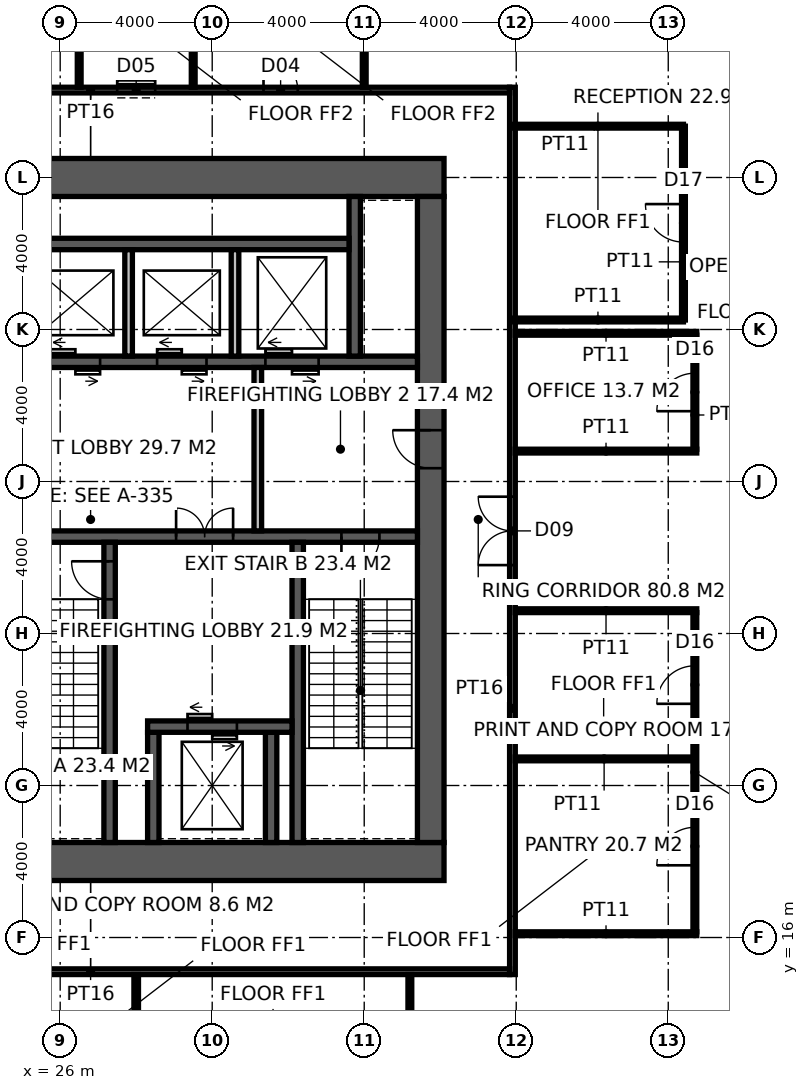
"""IFC4 building model, lengths in metres.
Left out: names, types, materials, properties, quantities, classifications, styles, units other than length and angle.
Written with IfcOpenShell. Run it as: python <this file> out.ifc"""

import sys

from ifc_helpers import new_model, si_unit, direction, frame, frame_2d, origin, place, context, subcontext, project, spatial, rectangle, extrude, element, fill, save


model = new_model("IFC4")
c1 = context("Model", 3, precision=1e-05, world=origin(), true_north=direction((0.0, 1.0)))
c2 = subcontext(c1, "Body", "Model", "MODEL_VIEW")
j1 = project(units=[si_unit("LENGTHUNIT", "METRE"), si_unit("PLANEANGLEUNIT", "RADIAN")], contexts=[c1])
p1 = place(None, origin())
s1 = spatial("IfcSite", under=j1, at=p1, CompositionType="ELEMENT")
p2 = place(p1, origin())
s2 = spatial("IfcBuilding", under=s1, at=p2, CompositionType="ELEMENT")
p3 = place(p2, frame((0.0, 0.0, 209.2)))
s3 = spatial("IfcBuildingStorey", under=s2, at=p3, CompositionType="ELEMENT", Elevation=209.2)
p4 = place(p3, frame((18.5, 18.0, -0.15), z_axis=(0.0, 0.0, 1.0), x_axis=(1.0, 0.0, 0.0)))
e1 = element("IfcWall", 1, at=p4, inside=s3, PredefinedType="SHEAR", context=c2, shape_type="SweptSolid", body=[
    extrude(rectangle(XDim=17.6, YDim=1.0, at=frame_2d((8.8, 0.0))), origin(), (0.0, 0.0, 1.0), 5.0),
])
p5 = place(p4, frame((3.45, 0.0, 0.15)))
e2 = element("IfcOpeningElement", 2, at=p5, cuts=e1, PredefinedType="OPENING", context=c2, shape_type="SweptSolid", body=[
    extrude(rectangle(XDim=1.5, YDim=2.4, at=frame_2d((0.75, 1.2))), frame((0.0, 0.51, 0.0), z_axis=(0.0, -1.0, 0.0), x_axis=(1.0, 0.0, 0.0)), (0.0, 0.0, 1.0), 1.02),
])
p6 = place(p3, frame((18.5, 36.0, -0.15), z_axis=(0.0, 0.0, 1.0), x_axis=(1.0, 0.0, 0.0)))
e3 = element("IfcWall", 3, at=p6, inside=s3, PredefinedType="SHEAR", context=c2, shape_type="SweptSolid", body=[
    extrude(rectangle(XDim=17.6, YDim=1.0, at=frame_2d((8.8, 0.0))), origin(), (0.0, 0.0, 1.0), 5.0),
])
p7 = place(p3, frame((35.75, 18.5, -0.15), z_axis=(0.0, 0.0, 1.0), x_axis=(0.0, 1.0, 0.0)))
e4 = element("IfcWall", 4, at=p7, inside=s3, PredefinedType="SHEAR", context=c2, shape_type="SweptSolid", body=[
    extrude(rectangle(XDim=17.0, YDim=0.7, at=frame_2d((8.5, 0.0))), origin(), (0.0, 0.0, 1.0), 5.0),
])
p8 = place(p7, frame((9.85, 0.0, 0.15)))
e5 = element("IfcOpeningElement", 5, at=p8, cuts=e4, PredefinedType="OPENING", context=c2, shape_type="SweptSolid", body=[
    extrude(rectangle(XDim=1.0, YDim=2.2, at=frame_2d((0.5, 1.1))), frame((0.0, 0.36, 0.0), z_axis=(0.0, -1.0, 0.0), x_axis=(1.0, 0.0, 0.0)), (0.0, 0.0, 1.0), 0.72),
])
p9 = place(p3, frame((24.15, 26.55, -0.15), z_axis=(0.0, 0.0, 1.0), x_axis=(1.0, 0.0, 0.0)))
e6 = element("IfcWall", 6, at=p9, inside=s3, PredefinedType="SHEAR", context=c2, shape_type="SweptSolid", body=[
    extrude(rectangle(XDim=11.25, YDim=0.3, at=frame_2d((5.625, 0.0))), origin(), (0.0, 0.0, 1.0), 5.0),
])
p10 = place(p9, frame((9.25, 0.0, 0.15)))
e7 = element("IfcOpeningElement", 7, at=p10, cuts=e6, PredefinedType="OPENING", context=c2, shape_type="SweptSolid", body=[
    extrude(rectangle(XDim=1.0, YDim=2.2, at=frame_2d((0.5, 1.1))), frame((0.0, 0.16, 0.0), z_axis=(0.0, -1.0, 0.0), x_axis=(1.0, 0.0, 0.0)), (0.0, 0.0, 1.0), 0.32),
])
p11 = place(p9, frame((4.9, 0.0, 0.15)))
e8 = element("IfcOpeningElement", 8, at=p11, cuts=e6, PredefinedType="OPENING", context=c2, shape_type="SweptSolid", body=[
    extrude(rectangle(XDim=1.5, YDim=2.4, at=frame_2d((0.75, 1.2))), frame((0.0, 0.16, 0.0), z_axis=(0.0, -1.0, 0.0), x_axis=(1.0, 0.0, 0.0)), (0.0, 0.0, 1.0), 0.32),
])
p12 = place(p3, frame((27.3, 18.5, -0.15), z_axis=(0.0, 0.0, 1.0), x_axis=(0.0, 1.0, 0.0)))
e9 = element("IfcWall", 9, at=p12, inside=s3, PredefinedType="SHEAR", context=c2, shape_type="SweptSolid", body=[
    extrude(rectangle(XDim=7.9, YDim=0.3, at=frame_2d((3.95, 0.0))), origin(), (0.0, 0.0, 1.0), 5.0),
])
p13 = place(p12, frame((6.4, 0.0, 0.15)))
e10 = element("IfcOpeningElement", 10, at=p13, cuts=e9, PredefinedType="OPENING", context=c2, shape_type="SweptSolid", body=[
    extrude(rectangle(XDim=1.0, YDim=2.2, at=frame_2d((0.5, 1.1))), frame((0.0, 0.16, 0.0), z_axis=(0.0, -1.0, 0.0), x_axis=(1.0, 0.0, 0.0)), (0.0, 0.0, 1.0), 0.32),
])
p14 = place(p3, frame((32.25, 18.5, -0.15), z_axis=(0.0, 0.0, 1.0), x_axis=(0.0, 1.0, 0.0)))
e11 = element("IfcWall", 11, at=p14, inside=s3, PredefinedType="SHEAR", context=c2, shape_type="SweptSolid", body=[
    extrude(rectangle(XDim=7.9, YDim=0.3, at=frame_2d((3.95, 0.0))), origin(), (0.0, 0.0, 1.0), 5.0),
])
for number, where, z_axis, x_axis in (
    (12, (28.45, 18.5, -0.15), (0.0, 0.0, 1.0), (0.0, 1.0, 0.0)),
    (13, (31.55, 18.5, -0.15), (0.0, 0.0, 1.0), (0.0, 1.0, 0.0)),
):
    element("IfcWall", number, at=place(p3, frame(where, z_axis=z_axis, x_axis=x_axis)), inside=s3, PredefinedType="SHEAR", context=c2, shape_type="SweptSolid", body=[
        extrude(rectangle(XDim=2.9, YDim=0.3, at=frame_2d((1.45, 0.0))), origin(), (0.0, 0.0, 1.0), 5.0),
    ])
p15 = place(p3, frame((28.3, 21.55, -0.15), z_axis=(0.0, 0.0, 1.0), x_axis=(1.0, 0.0, 0.0)))
e14 = element("IfcWall", 14, at=p15, inside=s3, PredefinedType="SHEAR", context=c2, shape_type="SweptSolid", body=[
    extrude(rectangle(XDim=3.8, YDim=0.3, at=frame_2d((1.9, 0.0))), origin(), (0.0, 0.0, 1.0), 5.0),
])
p16 = place(p15, frame((1.05, 0.0, 0.15)))
e15 = element("IfcOpeningElement", 15, at=p16, cuts=e14, PredefinedType="OPENING", context=c2, shape_type="SweptSolid", body=[
    extrude(rectangle(XDim=1.3, YDim=2.4, at=frame_2d((0.65, 1.2))), frame((0.0, 0.16, 0.0), z_axis=(0.0, -1.0, 0.0), x_axis=(1.0, 0.0, 0.0)), (0.0, 0.0, 1.0), 0.32),
])
p17 = place(p3, frame((24.15, 31.15, -0.15), z_axis=(0.0, 0.0, 1.0), x_axis=(1.0, 0.0, 0.0)))
e16 = element("IfcWall", 16, at=p17, inside=s3, PredefinedType="SHEAR", context=c2, shape_type="SweptSolid", body=[
    extrude(rectangle(XDim=11.25, YDim=0.3, at=frame_2d((5.625, 0.0))), origin(), (0.0, 0.0, 1.0), 5.0),
])
p18 = place(p17, frame((1.6, 0.0, 0.15)))
e17 = element("IfcOpeningElement", 17, at=p18, cuts=e16, PredefinedType="OPENING", context=c2, shape_type="SweptSolid", body=[
    extrude(rectangle(XDim=1.3, YDim=2.4, at=frame_2d((0.65, 1.2))), frame((0.0, 0.16, 0.0), z_axis=(0.0, -1.0, 0.0), x_axis=(1.0, 0.0, 0.0)), (0.0, 0.0, 1.0), 0.32),
])
p19 = place(p17, frame((4.4, 0.0, 0.15)))
e18 = element("IfcOpeningElement", 18, at=p19, cuts=e16, PredefinedType="OPENING", context=c2, shape_type="SweptSolid", body=[
    extrude(rectangle(XDim=1.3, YDim=2.4, at=frame_2d((0.65, 1.2))), frame((0.0, 0.16, 0.0), z_axis=(0.0, -1.0, 0.0), x_axis=(1.0, 0.0, 0.0)), (0.0, 0.0, 1.0), 0.32),
])
p20 = place(p17, frame((7.25, 0.0, 0.15)))
e19 = element("IfcOpeningElement", 19, at=p20, cuts=e16, PredefinedType="OPENING", context=c2, shape_type="SweptSolid", body=[
    extrude(rectangle(XDim=1.4, YDim=2.4, at=frame_2d((0.7, 1.2))), frame((0.0, 0.16, 0.0), z_axis=(0.0, -1.0, 0.0), x_axis=(1.0, 0.0, 0.0)), (0.0, 0.0, 1.0), 0.32),
])
p21 = place(p3, frame((33.75, 31.3, -0.15), z_axis=(0.0, 0.0, 1.0), x_axis=(0.0, 1.0, 0.0)))
e20 = element("IfcWall", 20, at=p21, inside=s3, PredefinedType="SHEAR", context=c2, shape_type="SweptSolid", body=[
    extrude(rectangle(XDim=4.2, YDim=0.3, at=frame_2d((2.1, 0.0))), origin(), (0.0, 0.0, 1.0), 5.0),
])
p22 = place(p3, frame((25.0, 34.25, -0.15), z_axis=(0.0, 0.0, 1.0), x_axis=(1.0, 0.0, 0.0)))
e21 = element("IfcWall", 21, at=p22, inside=s3, PredefinedType="SHEAR", context=c2, shape_type="SweptSolid", body=[
    extrude(rectangle(XDim=8.6, YDim=0.3, at=frame_2d((4.3, 0.0))), origin(), (0.0, 0.0, 1.0), 5.0),
])
for number, where, z_axis, x_axis in (
    (22, (27.8, 31.3, -0.15), (0.0, 0.0, 1.0), (0.0, 1.0, 0.0)),
    (23, (30.6, 31.3, -0.15), (0.0, 0.0, 1.0), (0.0, 1.0, 0.0)),
):
    element("IfcWall", number, at=place(p3, frame(where, z_axis=z_axis, x_axis=x_axis)), inside=s3, PredefinedType="SOLIDWALL", context=c2, shape_type="SweptSolid", body=[
        extrude(rectangle(XDim=2.8, YDim=0.2, at=frame_2d((1.4, 0.0))), origin(), (0.0, 0.0, 1.0), 5.0),
    ])
p23 = place(p3, frame((31.2, 26.7, 0.0), z_axis=(0.0, 0.0, 1.0), x_axis=(0.0, 1.0, 0.0)))
e24 = element("IfcWall", 24, at=p23, inside=s3, PredefinedType="SOLIDWALL", context=c2, shape_type="SweptSolid", body=[
    extrude(rectangle(XDim=4.3, YDim=0.2, at=frame_2d((2.15, 0.0))), origin(), (0.0, 0.0, 1.0), 4.85),
])
p24 = place(p3, frame((37.9, 15.025, 0.0), z_axis=(0.0, 0.0, 1.0), x_axis=(0.0, 1.0, 0.0)))
e25 = element("IfcWall", 25, at=p24, inside=s3, PredefinedType="PARTITIONING", context=c2, shape_type="SweptSolid", body=[
    extrude(rectangle(XDim=23.35, YDim=0.15, at=frame_2d((11.675, 0.0))), origin(), (0.0, 0.0, 1.0), 3.95),
])
p25 = place(p24, frame((10.775, 0.0, 0.0)))
e26 = element("IfcOpeningElement", 26, at=p25, cuts=e25, PredefinedType="OPENING", context=c2, shape_type="SweptSolid", body=[
    extrude(rectangle(XDim=1.8, YDim=2.4, at=frame_2d((0.9, 1.2))), frame((0.0, 0.085, 0.0), z_axis=(0.0, -1.0, 0.0), x_axis=(1.0, 0.0, 0.0)), (0.0, 0.0, 1.0), 0.17),
])
p26 = place(p3, frame((15.775, 15.1, 0.0), z_axis=(0.0, 0.0, 1.0), x_axis=(1.0, 0.0, 0.0)))
e27 = element("IfcWall", 27, at=p26, inside=s3, PredefinedType="PARTITIONING", context=c2, shape_type="SweptSolid", body=[
    extrude(rectangle(XDim=22.05, YDim=0.15, at=frame_2d((11.025, 0.0))), origin(), (0.0, 0.0, 1.0), 4.85),
])
p27 = place(p3, frame((15.775, 38.3, 0.0), z_axis=(0.0, 0.0, 1.0), x_axis=(1.0, 0.0, 0.0)))
e28 = element("IfcWall", 28, at=p27, inside=s3, PredefinedType="PARTITIONING", context=c2, shape_type="SweptSolid", body=[
    extrude(rectangle(XDim=22.05, YDim=0.15, at=frame_2d((11.025, 0.0))), origin(), (0.0, 0.0, 1.0), 4.85),
])
p28 = place(p27, frame((7.975, 0.0, 0.0)))
e29 = element("IfcOpeningElement", 29, at=p28, cuts=e28, PredefinedType="OPENING", context=c2, shape_type="SweptSolid", body=[
    extrude(rectangle(XDim=0.9, YDim=2.1, at=frame_2d((0.45, 1.05))), frame((0.0, 0.085, 0.0), z_axis=(0.0, -1.0, 0.0), x_axis=(1.0, 0.0, 0.0)), (0.0, 0.0, 1.0), 0.17),
])
p29 = place(p27, frame((11.725, 0.0, 0.0)))
e30 = element("IfcOpeningElement", 30, at=p29, cuts=e28, PredefinedType="OPENING", context=c2, shape_type="SweptSolid", body=[
    extrude(rectangle(XDim=1.0, YDim=2.1, at=frame_2d((0.5, 1.05))), frame((0.0, 0.085, 0.0), z_axis=(0.0, -1.0, 0.0), x_axis=(1.0, 0.0, 0.0)), (0.0, 0.0, 1.0), 0.17),
])
p30 = place(p27, frame((15.575, 0.0, 0.0)))
e31 = element("IfcOpeningElement", 31, at=p30, cuts=e28, PredefinedType="OPENING", context=c2, shape_type="SweptSolid", body=[
    extrude(rectangle(XDim=0.9, YDim=2.1, at=frame_2d((0.45, 1.05))), frame((0.0, 0.085, 0.0), z_axis=(0.0, -1.0, 0.0), x_axis=(1.0, 0.0, 0.0)), (0.0, 0.0, 1.0), 0.17),
])
p31 = place(p3, frame((34.0, 38.375, 0.0), z_axis=(0.0, 0.0, 1.0), x_axis=(0.0, 1.0, 0.0)))
e32 = element("IfcWall", 32, at=p31, inside=s3, PredefinedType="PARTITIONING", context=c2, shape_type="SweptSolid", body=[
    extrude(rectangle(XDim=3.675, YDim=0.1, at=frame_2d((1.837, 0.0))), origin(), (0.0, 0.0, 1.0), 3.95),
])
for number, where, z_axis, x_axis in (
    (33, (26.5, 38.375, 0.0), (0.0, 0.0, 1.0), (0.0, 1.0, 0.0)),
    (34, (29.5, 38.375, 0.0), (0.0, 0.0, 1.0), (0.0, 1.0, 0.0)),
):
    element("IfcWall", number, at=place(p3, frame(where, z_axis=z_axis, x_axis=x_axis)), inside=s3, PredefinedType="PARTITIONING", context=c2, shape_type="SweptSolid", body=[
        extrude(rectangle(XDim=3.575, YDim=0.1, at=frame_2d((1.788, 0.0))), origin(), (0.0, 0.0, 1.0), 4.85),
    ])
p32 = place(p3, frame((28.0, 8.3, 0.0), z_axis=(0.0, 0.0, 1.0), x_axis=(0.0, 1.0, 0.0)))
e35 = element("IfcWall", 35, at=p32, inside=s3, PredefinedType="PARTITIONING", context=c2, shape_type="SweptSolid", body=[
    extrude(rectangle(XDim=6.725, YDim=0.12, at=frame_2d((3.362, 0.0))), origin(), (0.0, 0.0, 1.0), 4.85),
])
p33 = place(p3, frame((37.975, 16.1, 0.0), z_axis=(0.0, 0.0, 1.0), x_axis=(1.0, 0.0, 0.0)))
e36 = element("IfcWall", 36, at=p33, inside=s3, PredefinedType="PARTITIONING", context=c2, shape_type="SweptSolid", body=[
    extrude(rectangle(XDim=4.775, YDim=0.1, at=frame_2d((2.387, 0.0))), origin(), (0.0, 0.0, 1.0), 4.85),
])
p34 = place(p3, frame((37.975, 20.7, 0.0), z_axis=(0.0, 0.0, 1.0), x_axis=(1.0, 0.0, 0.0)))
e37 = element("IfcWall", 37, at=p34, inside=s3, PredefinedType="PARTITIONING", context=c2, shape_type="SweptSolid", body=[
    extrude(rectangle(XDim=4.675, YDim=0.1, at=frame_2d((2.337, 0.0))), origin(), (0.0, 0.0, 1.0), 4.85),
])
for number, where, z_axis, x_axis in (
    (38, (37.975, 24.6, 0.0), (0.0, 0.0, 1.0), (1.0, 0.0, 0.0)),
    (39, (37.975, 28.8, 0.0), (0.0, 0.0, 1.0), (1.0, 0.0, 0.0)),
):
    element("IfcWall", number, at=place(p3, frame(where, z_axis=z_axis, x_axis=x_axis)), inside=s3, PredefinedType="PARTITIONING", context=c2, shape_type="SweptSolid", body=[
        extrude(rectangle(XDim=4.775, YDim=0.1, at=frame_2d((2.387, 0.0))), origin(), (0.0, 0.0, 1.0), 4.85),
    ])
p35 = place(p3, frame((37.975, 31.9, 0.0), z_axis=(0.0, 0.0, 1.0), x_axis=(1.0, 0.0, 0.0)))
e40 = element("IfcWall", 40, at=p35, inside=s3, PredefinedType="PARTITIONING", context=c2, shape_type="SweptSolid", body=[
    extrude(rectangle(XDim=4.775, YDim=0.1, at=frame_2d((2.387, 0.0))), origin(), (0.0, 0.0, 1.0), 3.95),
])
p36 = place(p3, frame((35.201, 11.55, 0.0), z_axis=(0.0, 0.0, 1.0), x_axis=(0.0, 1.0, 0.0)))
e41 = element("IfcWall", 41, at=p36, inside=s3, PredefinedType="PARTITIONING", context=c2, shape_type="SweptSolid", body=[
    extrude(rectangle(XDim=3.475, YDim=0.1, at=frame_2d((1.737, 0.0))), origin(), (0.0, 0.0, 1.0), 4.85),
])
p37 = place(p3, frame((42.7, 16.15, 0.0), z_axis=(0.0, 0.0, 1.0), x_axis=(0.0, 1.0, 0.0)))
e42 = element("IfcWall", 42, at=p37, inside=s3, PredefinedType="PARTITIONING", context=c2, shape_type="SweptSolid", body=[
    extrude(rectangle(XDim=8.4, YDim=0.1, at=frame_2d((4.2, 0.0))), origin(), (0.0, 0.0, 1.0), 4.85),
])
p38 = place(p37, frame((1.75, 0.0, 0.0)))
e43 = element("IfcOpeningElement", 43, at=p38, cuts=e42, PredefinedType="OPENING", context=c2, shape_type="SweptSolid", body=[
    extrude(rectangle(XDim=1.0, YDim=2.2, at=frame_2d((0.5, 1.1))), frame((0.0, 0.06, 0.0), z_axis=(0.0, -1.0, 0.0), x_axis=(1.0, 0.0, 0.0)), (0.0, 0.0, 1.0), 0.12),
])
p39 = place(p37, frame((6.0, 0.0, 0.0)))
e44 = element("IfcOpeningElement", 44, at=p39, cuts=e42, PredefinedType="OPENING", context=c2, shape_type="SweptSolid", body=[
    extrude(rectangle(XDim=1.0, YDim=2.2, at=frame_2d((0.5, 1.1))), frame((0.0, 0.06, 0.0), z_axis=(0.0, -1.0, 0.0), x_axis=(1.0, 0.0, 0.0)), (0.0, 0.0, 1.0), 0.12),
])
p40 = place(p3, frame((42.7, 28.85, 0.0), z_axis=(0.0, 0.0, 1.0), x_axis=(0.0, 1.0, 0.0)))
e45 = element("IfcWall", 45, at=p40, inside=s3, PredefinedType="PARTITIONING", context=c2, shape_type="SweptSolid", body=[
    extrude(rectangle(XDim=3.0, YDim=0.1, at=frame_2d((1.5, 0.0))), origin(), (0.0, 0.0, 1.0), 4.85),
])
p41 = place(p40, frame((1.0, 0.0, 0.0)))
e46 = element("IfcOpeningElement", 46, at=p41, cuts=e45, PredefinedType="OPENING", context=c2, shape_type="SweptSolid", body=[
    extrude(rectangle(XDim=1.0, YDim=2.2, at=frame_2d((0.5, 1.1))), frame((0.0, 0.06, 0.0), z_axis=(0.0, -1.0, 0.0), x_axis=(1.0, 0.0, 0.0)), (0.0, 0.0, 1.0), 0.12),
])
p42 = place(p3, frame((37.9, 32.25, 0.0), z_axis=(0.0, 0.0, 1.0), x_axis=(1.0, 0.0, 0.0)))
e47 = element("IfcWall", 47, at=p42, inside=s3, PredefinedType="PARTITIONING", context=c2, shape_type="SweptSolid", body=[
    extrude(rectangle(XDim=4.5, YDim=0.1, at=frame_2d((2.25, 0.0))), origin(), (0.0, 0.0, 1.0), 4.85),
])
p43 = place(p3, frame((42.4, 32.25, 0.0), z_axis=(0.0, 0.0, 1.0), x_axis=(0.0, 1.0, 0.0)))
e48 = element("IfcWall", 48, at=p43, inside=s3, PredefinedType="PARTITIONING", context=c2, shape_type="SweptSolid", body=[
    extrude(rectangle(XDim=5.1, YDim=0.1, at=frame_2d((2.55, 0.0))), origin(), (0.0, 0.0, 1.0), 3.95),
])
p44 = place(p43, frame((2.05, 0.0, 0.0)))
e49 = element("IfcOpeningElement", 49, at=p44, cuts=e48, PredefinedType="OPENING", context=c2, shape_type="SweptSolid", body=[
    extrude(rectangle(XDim=1.0, YDim=2.2, at=frame_2d((0.5, 1.1))), frame((0.0, 0.06, 0.0), z_axis=(0.0, -1.0, 0.0), x_axis=(1.0, 0.0, 0.0)), (0.0, 0.0, 1.0), 0.12),
])
p45 = place(p3, frame((42.4, 37.35, 0.0), z_axis=(0.0, 0.0, 1.0), x_axis=(-1.0, 0.0, 0.0)))
e50 = element("IfcWall", 50, at=p45, inside=s3, PredefinedType="PARTITIONING", context=c2, shape_type="SweptSolid", body=[
    extrude(rectangle(XDim=4.5, YDim=0.1, at=frame_2d((2.25, 0.0))), origin(), (0.0, 0.0, 1.0), 4.85),
])
p46 = place(p13, origin())
e51 = element("IfcDoor", 51, at=p46, inside=s3, OperationType="SINGLE_SWING_RIGHT", PredefinedType="DOOR", context=c2, shape_type="SweptSolid", body=[
    extrude(rectangle(XDim=1.0, YDim=2.2, at=frame_2d((0.5, 1.1))), frame((0.0, 0.025, 0.0), z_axis=(0.0, -1.0, 0.0), x_axis=(1.0, 0.0, 0.0)), (0.0, 0.0, 1.0), 0.05),
])
fill(e10, e51)
p47 = place(p10, frame((1.0, 0.0, 0.0), z_axis=(0.0, 0.0, 1.0), x_axis=(-1.0, 0.0, 0.0)))
e52 = element("IfcDoor", 52, at=p47, inside=s3, OperationType="SINGLE_SWING_RIGHT", PredefinedType="DOOR", context=c2, shape_type="SweptSolid", body=[
    extrude(rectangle(XDim=1.0, YDim=2.2, at=frame_2d((0.5, 1.1))), frame((0.0, 0.025, 0.0), z_axis=(0.0, -1.0, 0.0), x_axis=(1.0, 0.0, 0.0)), (0.0, 0.0, 1.0), 0.05),
])
fill(e7, e52)
p48 = place(p8, origin())
e53 = element("IfcDoor", 53, at=p48, inside=s3, OperationType="SINGLE_SWING_RIGHT", PredefinedType="DOOR", context=c2, shape_type="SweptSolid", body=[
    extrude(rectangle(XDim=1.0, YDim=2.2, at=frame_2d((0.5, 1.1))), frame((0.0, 0.025, 0.0), z_axis=(0.0, -1.0, 0.0), x_axis=(1.0, 0.0, 0.0)), (0.0, 0.0, 1.0), 0.05),
])
fill(e5, e53)
p49 = place(p11, origin())
e54 = element("IfcDoor", 54, at=p49, inside=s3, OperationType="DOUBLE_DOOR_DOUBLE_SWING", PredefinedType="DOOR", context=c2, shape_type="SweptSolid", body=[
    extrude(rectangle(XDim=1.5, YDim=2.4, at=frame_2d((0.75, 1.2))), frame((0.0, 0.025, 0.0), z_axis=(0.0, -1.0, 0.0), x_axis=(1.0, 0.0, 0.0)), (0.0, 0.0, 1.0), 0.05),
])
fill(e8, e54)
p50 = place(p29, origin())
e55 = element("IfcDoor", 55, at=p50, inside=s3, OperationType="SLIDING_TO_LEFT", PredefinedType="DOOR", context=c2, shape_type="SweptSolid", body=[
    extrude(rectangle(XDim=1.0, YDim=2.1, at=frame_2d((0.5, 1.05))), frame((0.0, 0.025, 0.0), z_axis=(0.0, -1.0, 0.0), x_axis=(1.0, 0.0, 0.0)), (0.0, 0.0, 1.0), 0.05),
])
fill(e30, e55)
p51 = place(p30, origin())
e56 = element("IfcDoor", 56, at=p51, inside=s3, OperationType="SINGLE_SWING_LEFT", PredefinedType="DOOR", context=c2, shape_type="SweptSolid", body=[
    extrude(rectangle(XDim=0.9, YDim=2.1, at=frame_2d((0.45, 1.05))), frame((0.0, 0.025, 0.0), z_axis=(0.0, -1.0, 0.0), x_axis=(1.0, 0.0, 0.0)), (0.0, 0.0, 1.0), 0.05),
])
fill(e31, e56)
p52 = place(p25, origin())
e57 = element("IfcDoor", 57, at=p52, inside=s3, OperationType="DOUBLE_DOOR_DOUBLE_SWING", PredefinedType="DOOR", context=c2, shape_type="SweptSolid", body=[
    extrude(rectangle(XDim=1.8, YDim=2.4, at=frame_2d((0.9, 1.2))), frame((0.0, 0.025, 0.0), z_axis=(0.0, -1.0, 0.0), x_axis=(1.0, 0.0, 0.0)), (0.0, 0.0, 1.0), 0.05),
])
fill(e26, e57)
p53 = place(p38, origin())
e58 = element("IfcDoor", 58, at=p53, inside=s3, OperationType="SINGLE_SWING_LEFT", PredefinedType="DOOR", context=c2, shape_type="SweptSolid", body=[
    extrude(rectangle(XDim=1.0, YDim=2.2, at=frame_2d((0.5, 1.1))), frame((0.0, 0.025, 0.0), z_axis=(0.0, -1.0, 0.0), x_axis=(1.0, 0.0, 0.0)), (0.0, 0.0, 1.0), 0.05),
])
fill(e43, e58)
p54 = place(p39, origin())
e59 = element("IfcDoor", 59, at=p54, inside=s3, OperationType="SINGLE_SWING_LEFT", PredefinedType="DOOR", context=c2, shape_type="SweptSolid", body=[
    extrude(rectangle(XDim=1.0, YDim=2.2, at=frame_2d((0.5, 1.1))), frame((0.0, 0.025, 0.0), z_axis=(0.0, -1.0, 0.0), x_axis=(1.0, 0.0, 0.0)), (0.0, 0.0, 1.0), 0.05),
])
fill(e44, e59)
p55 = place(p41, origin())
e60 = element("IfcDoor", 60, at=p55, inside=s3, OperationType="SINGLE_SWING_LEFT", PredefinedType="DOOR", context=c2, shape_type="SweptSolid", body=[
    extrude(rectangle(XDim=1.0, YDim=2.2, at=frame_2d((0.5, 1.1))), frame((0.0, 0.025, 0.0), z_axis=(0.0, -1.0, 0.0), x_axis=(1.0, 0.0, 0.0)), (0.0, 0.0, 1.0), 0.05),
])
fill(e46, e60)
p56 = place(p44, origin())
e61 = element("IfcDoor", 61, at=p56, inside=s3, OperationType="SINGLE_SWING_RIGHT", PredefinedType="DOOR", context=c2, shape_type="SweptSolid", body=[
    extrude(rectangle(XDim=1.0, YDim=2.2, at=frame_2d((0.5, 1.1))), frame((0.0, 0.025, 0.0), z_axis=(0.0, -1.0, 0.0), x_axis=(1.0, 0.0, 0.0)), (0.0, 0.0, 1.0), 0.05),
])
fill(e49, e61)
p57 = place(p16, origin())
e62 = element("IfcDoor", 62, at=p57, inside=s3, OperationType="DOUBLE_DOOR_SLIDING", PredefinedType="DOOR", context=c2, shape_type="SweptSolid", body=[
    extrude(rectangle(XDim=1.3, YDim=2.4, at=frame_2d((0.65, 1.2))), frame((0.0, 0.025, 0.0), z_axis=(0.0, -1.0, 0.0), x_axis=(1.0, 0.0, 0.0)), (0.0, 0.0, 1.0), 0.05),
])
fill(e15, e62)
p58 = place(p18, origin())
e63 = element("IfcDoor", 63, at=p58, inside=s3, OperationType="DOUBLE_DOOR_SLIDING", PredefinedType="DOOR", context=c2, shape_type="SweptSolid", body=[
    extrude(rectangle(XDim=1.3, YDim=2.4, at=frame_2d((0.65, 1.2))), frame((0.0, 0.025, 0.0), z_axis=(0.0, -1.0, 0.0), x_axis=(1.0, 0.0, 0.0)), (0.0, 0.0, 1.0), 0.05),
])
fill(e17, e63)
p59 = place(p19, origin())
e64 = element("IfcDoor", 64, at=p59, inside=s3, OperationType="DOUBLE_DOOR_SLIDING", PredefinedType="DOOR", context=c2, shape_type="SweptSolid", body=[
    extrude(rectangle(XDim=1.3, YDim=2.4, at=frame_2d((0.65, 1.2))), frame((0.0, 0.025, 0.0), z_axis=(0.0, -1.0, 0.0), x_axis=(1.0, 0.0, 0.0)), (0.0, 0.0, 1.0), 0.05),
])
fill(e18, e64)
p60 = place(p20, origin())
e65 = element("IfcDoor", 65, at=p60, inside=s3, OperationType="DOUBLE_DOOR_SLIDING", PredefinedType="DOOR", context=c2, shape_type="SweptSolid", body=[
    extrude(rectangle(XDim=1.4, YDim=2.4, at=frame_2d((0.7, 1.2))), frame((0.0, 0.025, 0.0), z_axis=(0.0, -1.0, 0.0), x_axis=(1.0, 0.0, 0.0)), (0.0, 0.0, 1.0), 0.05),
])
fill(e19, e65)
save(model, sys.argv[1])
